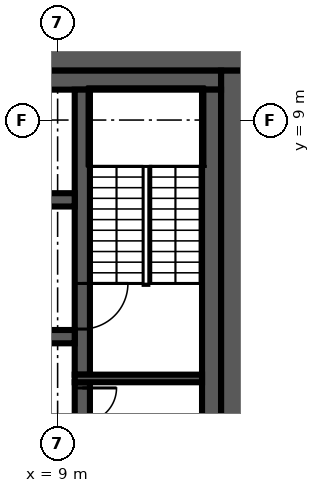
"""IFC4 building model, lengths in metres.
Left out: names, types, materials, properties, quantities, classifications, styles, units other than length and angle.
Written with IfcOpenShell. Run it as: python <this file> out.ifc"""

import sys

from ifc_helpers import new_model, si_unit, direction, frame, frame_2d, origin, place, context, subcontext, project, spatial, rectangle, extrude, element, fill, save


model = new_model("IFC4")
c1 = context("Model", 3, precision=1e-05, world=origin(), true_north=direction((0.0, 1.0)))
c2 = subcontext(c1, "Body", "Model", "MODEL_VIEW")
j1 = project(units=[si_unit("LENGTHUNIT", "METRE"), si_unit("PLANEANGLEUNIT", "RADIAN")], contexts=[c1])
p1 = place(None, origin())
s1 = spatial("IfcSite", under=j1, at=p1, CompositionType="ELEMENT")
p2 = place(p1, origin())
s2 = spatial("IfcBuilding", under=s1, at=p2, CompositionType="ELEMENT")
p3 = place(p2, frame((0.0, 0.0, 279.0)))
s3 = spatial("IfcBuildingStorey", under=s2, at=p3, CompositionType="ELEMENT", Elevation=279.0)
p4 = place(p3, frame((-14.0, 10.65, 0.0), z_axis=(0.0, 0.0, 1.0), x_axis=(1.0, 0.0, 0.0)))
e1 = element("IfcWall", 1, at=p4, inside=s3, PredefinedType="SHEAR", context=c2, shape_type="SweptSolid", body=[
    extrude(rectangle(XDim=28.0, YDim=0.7, at=frame_2d((14.0, 0.0))), origin(), (0.0, 0.0, 1.0), 3.6),
])
p5 = place(p4, frame((15.9, 0.0, 0.0)))
e2 = element("IfcOpeningElement", 2, at=p5, cuts=e1, PredefinedType="OPENING", context=c2, shape_type="SweptSolid", body=[
    extrude(rectangle(XDim=1.6, YDim=2.1, at=frame_2d((0.8, 1.05))), frame((0.0, 0.36, 0.0), z_axis=(0.0, -1.0, 0.0), x_axis=(1.0, 0.0, 0.0)), (0.0, 0.0, 1.0), 0.72),
])
p6 = place(p3, frame((13.65, 10.3, 0.0), z_axis=(0.0, 0.0, 1.0), x_axis=(0.0, -1.0, 0.0)))
e3 = element("IfcWall", 3, at=p6, inside=s3, PredefinedType="SHEAR", context=c2, shape_type="SweptSolid", body=[
    extrude(rectangle(XDim=20.6, YDim=0.7, at=frame_2d((10.3, 0.0))), origin(), (0.0, 0.0, 1.0), 3.6),
])
p7 = place(p3, frame((3.9, 10.05, 0.0), z_axis=(0.0, 0.0, 1.0), x_axis=(1.0, 0.0, 0.0)))
e4 = element("IfcWall", 4, at=p7, inside=s3, PredefinedType="SHEAR", context=c2, shape_type="SweptSolid", body=[
    extrude(rectangle(XDim=9.4, YDim=0.5, at=frame_2d((4.7, 0.0))), origin(), (0.0, 0.0, 1.0), 3.6),
])
p8 = place(p3, frame((13.05, 9.8, 0.0), z_axis=(0.0, 0.0, 1.0), x_axis=(0.0, -1.0, 0.0)))
e5 = element("IfcWall", 5, at=p8, inside=s3, PredefinedType="SHEAR", context=c2, shape_type="SweptSolid", body=[
    extrude(rectangle(XDim=19.6, YDim=0.5, at=frame_2d((9.8, 0.0))), origin(), (0.0, 0.0, 1.0), 3.6),
])
p9 = place(p3, frame((9.65, 2.1, 0.0), z_axis=(0.0, 0.0, 1.0), x_axis=(0.0, -1.0, 0.0)))
e6 = element("IfcWall", 6, at=p9, inside=s3, PredefinedType="SHEAR", context=c2, shape_type="SweptSolid", body=[
    extrude(rectangle(XDim=4.2, YDim=0.4, at=frame_2d((2.1, 0.0))), origin(), (0.0, 0.0, 1.0), 3.6),
])
p10 = place(p9, frame((0.15, 0.0, 0.0)))
e7 = element("IfcOpeningElement", 7, at=p10, cuts=e6, PredefinedType="OPENING", context=c2, shape_type="SweptSolid", body=[
    extrude(rectangle(XDim=0.9, YDim=2.1, at=frame_2d((0.45, 1.05))), frame((0.0, 0.21, 0.0), z_axis=(0.0, -1.0, 0.0), x_axis=(1.0, 0.0, 0.0)), (0.0, 0.0, 1.0), 0.42),
])
p11 = place(p3, frame((9.65, 9.8, 0.0), z_axis=(0.0, 0.0, 1.0), x_axis=(0.0, -1.0, 0.0)))
e8 = element("IfcWall", 8, at=p11, inside=s3, PredefinedType="SHEAR", context=c2, shape_type="SweptSolid", body=[
    extrude(rectangle(XDim=7.5, YDim=0.4, at=frame_2d((3.75, 0.0))), origin(), (0.0, 0.0, 1.0), 3.6),
])
p12 = place(p11, frame((5.1, 0.0, 0.0)))
e9 = element("IfcOpeningElement", 9, at=p12, cuts=e8, PredefinedType="OPENING", context=c2, shape_type="SweptSolid", body=[
    extrude(rectangle(XDim=1.2, YDim=2.1, at=frame_2d((0.6, 1.05))), frame((0.0, 0.21, 0.0), z_axis=(0.0, -1.0, 0.0), x_axis=(1.0, 0.0, 0.0)), (0.0, 0.0, 1.0), 0.42),
])
p13 = place(p3, frame((9.45, 2.2, 0.0), z_axis=(0.0, 0.0, 1.0), x_axis=(1.0, 0.0, 0.0)))
e10 = element("IfcWall", 10, at=p13, inside=s3, PredefinedType="SHEAR", context=c2, shape_type="SweptSolid", body=[
    extrude(rectangle(XDim=3.35, YDim=0.2, at=frame_2d((1.675, 0.0))), origin(), (0.0, 0.0, 1.0), 3.6),
])
p14 = place(p3, frame((-9.45, 6.9, 0.0), z_axis=(0.0, 0.0, 1.0), x_axis=(1.0, 0.0, 0.0)))
e11 = element("IfcWall", 11, at=p14, inside=s3, PredefinedType="SHEAR", context=c2, shape_type="SweptSolid", body=[
    extrude(rectangle(XDim=18.9, YDim=0.35, at=frame_2d((9.45, 0.0))), origin(), (0.0, 0.0, 1.0), 3.6),
])
p15 = place(p14, frame((11.55, 0.0, 0.0)))
e12 = element("IfcOpeningElement", 12, at=p15, cuts=e11, PredefinedType="OPENING", context=c2, shape_type="SweptSolid", body=[
    extrude(rectangle(XDim=1.2, YDim=2.1, at=frame_2d((0.6, 1.05))), frame((0.0, 0.185, 0.0), z_axis=(0.0, -1.0, 0.0), x_axis=(1.0, 0.0, 0.0)), (0.0, 0.0, 1.0), 0.37),
])
p16 = place(p14, frame((14.3, 0.0, 0.0)))
e13 = element("IfcOpeningElement", 13, at=p16, cuts=e11, PredefinedType="OPENING", context=c2, shape_type="SweptSolid", body=[
    extrude(rectangle(XDim=1.1, YDim=2.1, at=frame_2d((0.55, 1.05))), frame((0.0, 0.185, 0.0), z_axis=(0.0, -1.0, 0.0), x_axis=(1.0, 0.0, 0.0)), (0.0, 0.0, 1.0), 0.37),
])
p17 = place(p14, frame((17.0, 0.0, 0.0)))
e14 = element("IfcOpeningElement", 14, at=p17, cuts=e11, PredefinedType="OPENING", context=c2, shape_type="SweptSolid", body=[
    extrude(rectangle(XDim=1.1, YDim=2.1, at=frame_2d((0.55, 1.05))), frame((0.0, 0.185, 0.0), z_axis=(0.0, -1.0, 0.0), x_axis=(1.0, 0.0, 0.0)), (0.0, 0.0, 1.0), 0.37),
])
p18 = place(p14, frame((0.9, 0.0, 0.0)))
e15 = element("IfcOpeningElement", 15, at=p18, cuts=e11, PredefinedType="OPENING", context=c2, shape_type="SweptSolid", body=[
    extrude(rectangle(XDim=0.9, YDim=2.1, at=frame_2d((0.45, 1.05))), frame((0.0, 0.185, 0.0), z_axis=(0.0, -1.0, 0.0), x_axis=(1.0, 0.0, 0.0)), (0.0, 0.0, 1.0), 0.37),
])
p19 = place(p14, frame((4.95, 0.0, 0.0)))
e16 = element("IfcOpeningElement", 16, at=p19, cuts=e11, PredefinedType="OPENING", context=c2, shape_type="SweptSolid", body=[
    extrude(rectangle(XDim=0.9, YDim=2.1, at=frame_2d((0.45, 1.05))), frame((0.0, 0.185, 0.0), z_axis=(0.0, -1.0, 0.0), x_axis=(1.0, 0.0, 0.0)), (0.0, 0.0, 1.0), 0.37),
])
p20 = place(p14, frame((9.0, 0.0, 0.0)))
e17 = element("IfcOpeningElement", 17, at=p20, cuts=e11, PredefinedType="OPENING", context=c2, shape_type="SweptSolid", body=[
    extrude(rectangle(XDim=0.9, YDim=2.1, at=frame_2d((0.45, 1.05))), frame((0.0, 0.185, 0.0), z_axis=(0.0, -1.0, 0.0), x_axis=(1.0, 0.0, 0.0)), (0.0, 0.0, 1.0), 0.37),
])
p21 = place(p3, frame((9.45, 3.3, 0.0), z_axis=(0.0, 0.0, 1.0), x_axis=(-1.0, 0.0, 0.0)))
e18 = element("IfcWall", 18, at=p21, inside=s3, PredefinedType="SHEAR", context=c2, shape_type="SweptSolid", body=[
    extrude(rectangle(XDim=18.9, YDim=0.35, at=frame_2d((9.45, 0.0))), origin(), (0.0, 0.0, 1.0), 3.6),
])
p22 = place(p21, frame((6.2, 0.0, 0.0)))
e19 = element("IfcOpeningElement", 19, at=p22, cuts=e18, PredefinedType="OPENING", context=c2, shape_type="SweptSolid", body=[
    extrude(rectangle(XDim=1.1, YDim=2.1, at=frame_2d((0.55, 1.05))), frame((0.0, 0.185, 0.0), z_axis=(0.0, -1.0, 0.0), x_axis=(1.0, 0.0, 0.0)), (0.0, 0.0, 1.0), 0.37),
])
p23 = place(p21, frame((3.5, 0.0, 0.0)))
e20 = element("IfcOpeningElement", 20, at=p23, cuts=e18, PredefinedType="OPENING", context=c2, shape_type="SweptSolid", body=[
    extrude(rectangle(XDim=1.1, YDim=2.1, at=frame_2d((0.55, 1.05))), frame((0.0, 0.185, 0.0), z_axis=(0.0, -1.0, 0.0), x_axis=(1.0, 0.0, 0.0)), (0.0, 0.0, 1.0), 0.37),
])
p24 = place(p21, frame((0.9, 0.0, 0.0)))
e21 = element("IfcOpeningElement", 21, at=p24, cuts=e18, PredefinedType="OPENING", context=c2, shape_type="SweptSolid", body=[
    extrude(rectangle(XDim=0.9, YDim=2.1, at=frame_2d((0.45, 1.05))), frame((0.0, 0.185, 0.0), z_axis=(0.0, -1.0, 0.0), x_axis=(1.0, 0.0, 0.0)), (0.0, 0.0, 1.0), 0.37),
])
p25 = place(p21, frame((15.75, 0.0, 0.0)))
e22 = element("IfcOpeningElement", 22, at=p25, cuts=e18, PredefinedType="OPENING", context=c2, shape_type="SweptSolid", body=[
    extrude(rectangle(XDim=0.9, YDim=2.1, at=frame_2d((0.45, 1.05))), frame((0.0, 0.185, 0.0), z_axis=(0.0, -1.0, 0.0), x_axis=(1.0, 0.0, 0.0)), (0.0, 0.0, 1.0), 0.37),
])
p26 = place(p21, frame((11.7, 0.0, 0.0)))
e23 = element("IfcOpeningElement", 23, at=p26, cuts=e18, PredefinedType="OPENING", context=c2, shape_type="SweptSolid", body=[
    extrude(rectangle(XDim=0.9, YDim=2.1, at=frame_2d((0.45, 1.05))), frame((0.0, 0.185, 0.0), z_axis=(0.0, -1.0, 0.0), x_axis=(1.0, 0.0, 0.0)), (0.0, 0.0, 1.0), 0.37),
])
p27 = place(p21, frame((9.0, 0.0, 0.0)))
e24 = element("IfcOpeningElement", 24, at=p27, cuts=e18, PredefinedType="OPENING", context=c2, shape_type="SweptSolid", body=[
    extrude(rectangle(XDim=0.9, YDim=2.1, at=frame_2d((0.45, 1.05))), frame((0.0, 0.185, 0.0), z_axis=(0.0, -1.0, 0.0), x_axis=(1.0, 0.0, 0.0)), (0.0, 0.0, 1.0), 0.37),
])
p28 = place(p10, origin())
e25 = element("IfcDoor", 25, at=p28, inside=s3, OperationType="SINGLE_SWING_RIGHT", PredefinedType="DOOR", context=c2, shape_type="SweptSolid", body=[
    extrude(rectangle(XDim=0.9, YDim=2.1, at=frame_2d((0.45, 1.05))), frame((0.0, 0.025, 0.0), z_axis=(0.0, -1.0, 0.0), x_axis=(1.0, 0.0, 0.0)), (0.0, 0.0, 1.0), 0.05),
])
fill(e7, e25)
p29 = place(p12, origin())
e26 = element("IfcDoor", 26, at=p29, inside=s3, OperationType="SINGLE_SWING_LEFT", PredefinedType="DOOR", context=c2, shape_type="SweptSolid", body=[
    extrude(rectangle(XDim=1.2, YDim=2.1, at=frame_2d((0.6, 1.05))), frame((0.0, 0.025, 0.0), z_axis=(0.0, -1.0, 0.0), x_axis=(1.0, 0.0, 0.0)), (0.0, 0.0, 1.0), 0.05),
])
fill(e9, e26)
save(model, sys.argv[1])
